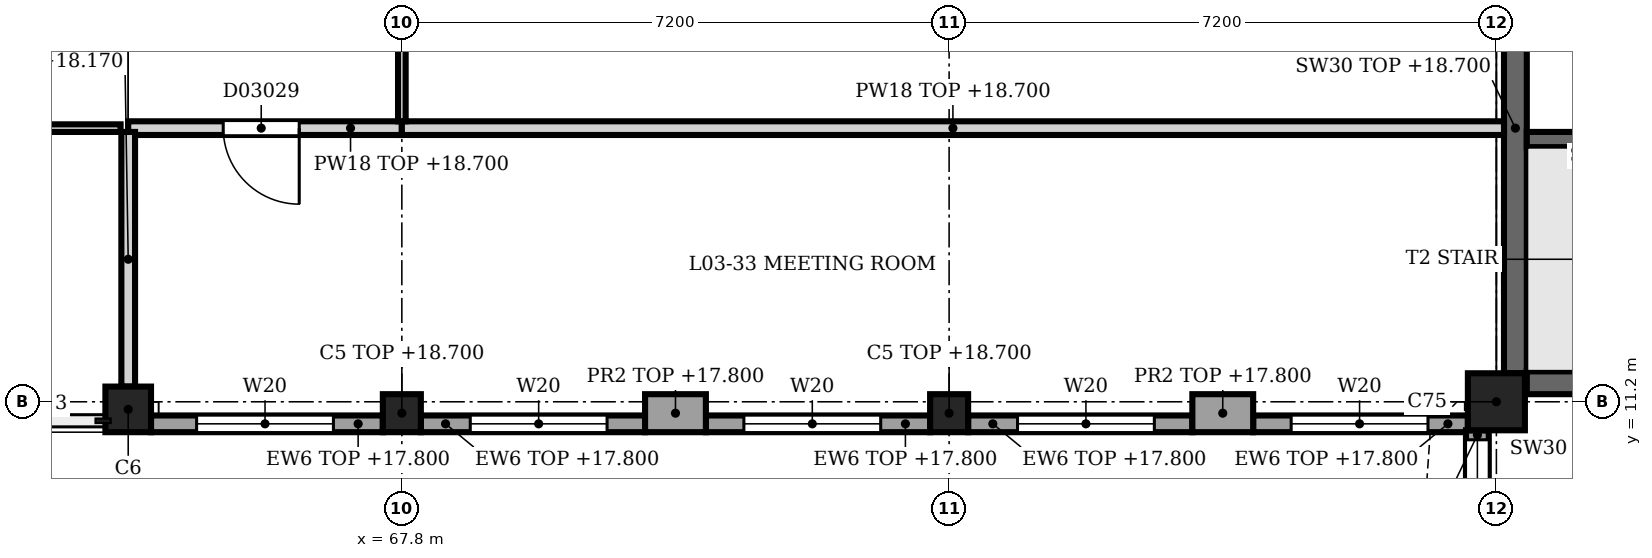
"""IFC4 building model, lengths in metres.
Left out: names, types, materials, properties, quantities, classifications, styles, units other than length and angle.
Written with IfcOpenShell. Run it as: python <this file> out.ifc"""

import sys

from ifc_helpers import new_model, si_unit, direction, frame, frame_2d, origin, origin_2d, place, context, subcontext, project, spatial, rectangle, extrude, element, fill, save


model = new_model("IFC4")
c1 = context("Model", 3, precision=1e-05, world=origin(), true_north=direction((0.0, 1.0)))
c2 = subcontext(c1, "Body", "Model", "MODEL_VIEW")
j1 = project(units=[si_unit("LENGTHUNIT", "METRE"), si_unit("PLANEANGLEUNIT", "RADIAN")], contexts=[c1])
p1 = place(None, origin())
s1 = spatial("IfcSite", under=j1, at=p1, CompositionType="ELEMENT")
p2 = place(p1, origin())
s2 = spatial("IfcBuilding", under=s1, at=p2, CompositionType="ELEMENT")
p3 = place(p2, frame((0.0, 0.0, 14.4)))
s3 = spatial("IfcBuildingStorey", under=s2, at=p3, CompositionType="ELEMENT", Elevation=14.4)
p4 = place(p3, frame((82.2, 11.2, 0.0), z_axis=(0.0, 0.0, 1.0), x_axis=(1.0, 0.0, 0.0)))
e1 = element("IfcColumn", 1, at=p4, inside=s3, PredefinedType="COLUMN", context=c2, shape_type="SweptSolid", body=[
    extrude(rectangle(XDim=0.75, YDim=0.75, at=origin_2d()), origin(), (0.0, 0.0, 1.0), 4.5),
])
p5 = place(p3, frame((64.2, 11.1, 0.0), z_axis=(0.0, 0.0, 1.0), x_axis=(1.0, 0.0, 0.0)))
e2 = element("IfcColumn", 2, at=p5, inside=s3, PredefinedType="COLUMN", context=c2, shape_type="SweptSolid", body=[
    extrude(rectangle(XDim=0.6, YDim=0.6, at=origin_2d()), origin(), (0.0, 0.0, 1.0), 4.5),
])
for number, where, z_axis, x_axis in (
    (3, (67.8, 11.05, 0.0), (0.0, 0.0, 1.0), (1.0, 0.0, 0.0)),
    (4, (75.0, 11.05, 0.0), (0.0, 0.0, 1.0), (1.0, 0.0, 0.0)),
):
    element("IfcColumn", number, at=place(p3, frame(where, z_axis=z_axis, x_axis=x_axis)), inside=s3, PredefinedType="COLUMN", context=c2, shape_type="SweptSolid", body=[
        extrude(rectangle(XDim=0.5, YDim=0.5, at=origin_2d()), origin(), (0.0, 0.0, 1.0), 4.3),
    ])
p6 = place(p3, frame((81.95, 8.0, 0.0), z_axis=(0.0, 0.0, 1.0), x_axis=(0.0, 1.0, 0.0)))
e5 = element("IfcWall", 5, at=p6, inside=s3, PredefinedType="SOLIDWALL", context=c2, shape_type="SweptSolid", body=[
    extrude(rectangle(XDim=2.825, YDim=0.3, at=frame_2d((1.413, 0.0))), origin(), (0.0, 0.0, 1.0), 3.4),
])
p7 = place(p6, frame((0.1, 0.0, 0.9)))
e6 = element("IfcOpeningElement", 6, at=p7, cuts=e5, PredefinedType="OPENING", context=c2, shape_type="SweptSolid", body=[
    extrude(rectangle(XDim=2.6, YDim=2.4, at=frame_2d((1.3, 1.2))), frame((0.0, 0.16, 0.0), z_axis=(0.0, -1.0, 0.0), x_axis=(1.0, 0.0, 0.0)), (0.0, 0.0, 1.0), 0.32),
])
for number, where, z_axis, x_axis in (
    (7, (79.0, 11.05, 0.0), (0.0, 0.0, 1.0), (-1.0, 0.0, 0.0)),
    (8, (71.8, 11.05, 0.0), (0.0, 0.0, 1.0), (-1.0, 0.0, 0.0)),
):
    element("IfcWall", number, at=place(p3, frame(where, z_axis=z_axis, x_axis=x_axis)), inside=s3, PredefinedType="SOLIDWALL", context=c2, shape_type="SweptSolid", body=[
        extrude(rectangle(XDim=0.8, YDim=0.5, at=frame_2d((0.4, 0.0))), origin(), (0.0, 0.0, 1.0), 3.4),
    ])
p8 = place(p3, frame((81.825, 10.91, 0.0), z_axis=(0.0, 0.0, 1.0), x_axis=(-1.0, 0.0, 0.0)))
e9 = element("IfcWall", 9, at=p8, inside=s3, PredefinedType="SOLIDWALL", context=c2, shape_type="SweptSolid", body=[
    extrude(rectangle(XDim=2.825, YDim=0.22, at=frame_2d((1.413, 0.0))), origin(), (0.0, 0.0, 1.0), 3.4),
])
p9 = place(p8, frame((0.525, 0.0, 0.45)))
e10 = element("IfcOpeningElement", 10, at=p9, cuts=e9, PredefinedType="OPENING", context=c2, shape_type="SweptSolid", body=[
    extrude(rectangle(XDim=1.8, YDim=2.7, at=frame_2d((0.9, 1.35))), frame((0.0, 0.12, 0.0), z_axis=(0.0, -1.0, 0.0), x_axis=(1.0, 0.0, 0.0)), (0.0, 0.0, 1.0), 0.24),
])
p10 = place(p3, frame((78.2, 10.91, 0.0), z_axis=(0.0, 0.0, 1.0), x_axis=(-1.0, 0.0, 0.0)))
e11 = element("IfcWall", 11, at=p10, inside=s3, PredefinedType="SOLIDWALL", context=c2, shape_type="SweptSolid", body=[
    extrude(rectangle(XDim=2.95, YDim=0.22, at=frame_2d((1.475, 0.0))), origin(), (0.0, 0.0, 1.0), 3.4),
])
p11 = place(p10, frame((0.5, 0.0, 0.45)))
e12 = element("IfcOpeningElement", 12, at=p11, cuts=e11, PredefinedType="OPENING", context=c2, shape_type="SweptSolid", body=[
    extrude(rectangle(XDim=1.8, YDim=2.7, at=frame_2d((0.9, 1.35))), frame((0.0, 0.12, 0.0), z_axis=(0.0, -1.0, 0.0), x_axis=(1.0, 0.0, 0.0)), (0.0, 0.0, 1.0), 0.24),
])
p12 = place(p3, frame((74.75, 10.91, 0.0), z_axis=(0.0, 0.0, 1.0), x_axis=(-1.0, 0.0, 0.0)))
e13 = element("IfcWall", 13, at=p12, inside=s3, PredefinedType="SOLIDWALL", context=c2, shape_type="SweptSolid", body=[
    extrude(rectangle(XDim=2.95, YDim=0.22, at=frame_2d((1.475, 0.0))), origin(), (0.0, 0.0, 1.0), 3.4),
])
p13 = place(p12, frame((0.65, 0.0, 0.45)))
e14 = element("IfcOpeningElement", 14, at=p13, cuts=e13, PredefinedType="OPENING", context=c2, shape_type="SweptSolid", body=[
    extrude(rectangle(XDim=1.8, YDim=2.7, at=frame_2d((0.9, 1.35))), frame((0.0, 0.12, 0.0), z_axis=(0.0, -1.0, 0.0), x_axis=(1.0, 0.0, 0.0)), (0.0, 0.0, 1.0), 0.24),
])
p14 = place(p3, frame((71.0, 10.91, 0.0), z_axis=(0.0, 0.0, 1.0), x_axis=(-1.0, 0.0, 0.0)))
e15 = element("IfcWall", 15, at=p14, inside=s3, PredefinedType="SOLIDWALL", context=c2, shape_type="SweptSolid", body=[
    extrude(rectangle(XDim=2.95, YDim=0.22, at=frame_2d((1.475, 0.0))), origin(), (0.0, 0.0, 1.0), 3.4),
])
p15 = place(p14, frame((0.5, 0.0, 0.45)))
e16 = element("IfcOpeningElement", 16, at=p15, cuts=e15, PredefinedType="OPENING", context=c2, shape_type="SweptSolid", body=[
    extrude(rectangle(XDim=1.8, YDim=2.7, at=frame_2d((0.9, 1.35))), frame((0.0, 0.12, 0.0), z_axis=(0.0, -1.0, 0.0), x_axis=(1.0, 0.0, 0.0)), (0.0, 0.0, 1.0), 0.24),
])
p16 = place(p3, frame((67.55, 10.91, 0.0), z_axis=(0.0, 0.0, 1.0), x_axis=(-1.0, 0.0, 0.0)))
e17 = element("IfcWall", 17, at=p16, inside=s3, PredefinedType="SOLIDWALL", context=c2, shape_type="SweptSolid", body=[
    extrude(rectangle(XDim=3.05, YDim=0.22, at=frame_2d((1.525, 0.0))), origin(), (0.0, 0.0, 1.0), 3.4),
])
p17 = place(p16, frame((0.65, 0.0, 0.45)))
e18 = element("IfcOpeningElement", 18, at=p17, cuts=e17, PredefinedType="OPENING", context=c2, shape_type="SweptSolid", body=[
    extrude(rectangle(XDim=1.8, YDim=2.7, at=frame_2d((0.9, 1.35))), frame((0.0, 0.12, 0.0), z_axis=(0.0, -1.0, 0.0), x_axis=(1.0, 0.0, 0.0)), (0.0, 0.0, 1.0), 0.24),
])
p18 = place(p3, frame((82.45, 11.575, 0.0), z_axis=(0.0, 0.0, 1.0), x_axis=(0.0, 1.0, 0.0)))
e19 = element("IfcWall", 19, at=p18, inside=s3, PredefinedType="SHEAR", context=c2, shape_type="SweptSolid", body=[
    extrude(rectangle(XDim=6.45, YDim=0.3, at=frame_2d((3.225, 0.0))), origin(), (0.0, 0.0, 1.0), 4.3),
])
p19 = place(p3, frame((82.6, 11.45, 0.0), z_axis=(0.0, 0.0, 1.0), x_axis=(1.0, 0.0, 0.0)))
e20 = element("IfcWall", 20, at=p19, inside=s3, PredefinedType="SHEAR", context=c2, shape_type="SweptSolid", body=[
    extrude(rectangle(XDim=6.4, YDim=0.3, at=frame_2d((3.2, 0.0))), origin(), (0.0, 0.0, 1.0), 4.3),
])
p20 = place(p3, frame((89.0, 14.65, 0.0), z_axis=(0.0, 0.0, 1.0), x_axis=(-1.0, 0.0, 0.0)))
e21 = element("IfcWall", 21, at=p20, inside=s3, PredefinedType="SHEAR", context=c2, shape_type="SweptSolid", body=[
    extrude(rectangle(XDim=6.4, YDim=0.2, at=frame_2d((3.2, 0.0))), origin(), (0.0, 0.0, 1.0), 4.3),
])
p21 = place(p20, frame((0.1, 0.0, 0.0)))
e22 = element("IfcOpeningElement", 22, at=p21, cuts=e21, PredefinedType="OPENING", context=c2, shape_type="SweptSolid", body=[
    extrude(rectangle(XDim=1.0, YDim=2.1, at=frame_2d((0.5, 1.05))), frame((0.0, 0.11, 0.0), z_axis=(0.0, -1.0, 0.0), x_axis=(1.0, 0.0, 0.0)), (0.0, 0.0, 1.0), 0.22),
])
p22 = place(p3, frame((64.1, 14.8, 0.0), z_axis=(0.0, 0.0, 1.0), x_axis=(-1.0, 0.0, 0.0)))
e23 = element("IfcWall", 23, at=p22, inside=s3, PredefinedType="PARTITIONING", context=c2, shape_type="SweptSolid", body=[
    extrude(rectangle(XDim=3.4, YDim=0.1, at=frame_2d((1.7, 0.0))), origin(), (0.0, 0.0, 1.0), 11.4),
])
p23 = place(p22, frame((1.15, 0.0, 0.0)))
e24 = element("IfcOpeningElement", 24, at=p23, cuts=e23, PredefinedType="OPENING", context=c2, shape_type="SweptSolid", body=[
    extrude(rectangle(XDim=1.0, YDim=2.1, at=frame_2d((0.5, 1.05))), frame((0.0, 0.06, 0.0), z_axis=(0.0, -1.0, 0.0), x_axis=(1.0, 0.0, 0.0)), (0.0, 0.0, 1.0), 0.12),
])
p24 = place(p3, frame((67.8, 14.8, 0.0), z_axis=(0.0, 0.0, 1.0), x_axis=(-1.0, 0.0, 0.0)))
e25 = element("IfcWall", 25, at=p24, inside=s3, PredefinedType="PARTITIONING", context=c2, shape_type="SweptSolid", body=[
    extrude(rectangle(XDim=3.6, YDim=0.18, at=frame_2d((1.8, 0.0))), origin(), (0.0, 0.0, 1.0), 4.3),
])
p25 = place(p24, frame((1.35, 0.0, 0.0)))
e26 = element("IfcOpeningElement", 26, at=p25, cuts=e25, PredefinedType="OPENING", context=c2, shape_type="SweptSolid", body=[
    extrude(rectangle(XDim=1.0, YDim=2.1, at=frame_2d((0.5, 1.05))), frame((0.0, 0.1, 0.0), z_axis=(0.0, -1.0, 0.0), x_axis=(1.0, 0.0, 0.0)), (0.0, 0.0, 1.0), 0.2),
])
p26 = place(p3, frame((67.8, 14.8, 0.0), z_axis=(0.0, 0.0, 1.0), x_axis=(1.0, 0.0, 0.0)))
e27 = element("IfcWall", 27, at=p26, inside=s3, PredefinedType="PARTITIONING", context=c2, shape_type="SweptSolid", body=[
    extrude(rectangle(XDim=14.5, YDim=0.18, at=frame_2d((7.25, 0.0))), origin(), (0.0, 0.0, 1.0), 4.3),
])
p27 = place(p3, frame((64.2, 11.4, 0.0), z_axis=(0.0, 0.0, 1.0), x_axis=(0.0, 1.0, 0.0)))
e28 = element("IfcWall", 28, at=p27, inside=s3, PredefinedType="PARTITIONING", context=c2, shape_type="SweptSolid", body=[
    extrude(rectangle(XDim=3.35, YDim=0.18, at=frame_2d((1.675, 0.0))), origin(), (0.0, 0.0, 1.0), 3.77),
])
p28 = place(p3, frame((67.8, 18.15, 0.0), z_axis=(0.0, 0.0, 1.0), x_axis=(0.0, -1.0, 0.0)))
e29 = element("IfcWall", 29, at=p28, inside=s3, PredefinedType="PARTITIONING", context=c2, shape_type="SweptSolid", body=[
    extrude(rectangle(XDim=3.26, YDim=0.1, at=frame_2d((1.63, 0.0))), origin(), (0.0, 0.0, 1.0), 3.57),
])
p29 = place(p28, origin())
e30 = element("IfcOpeningElement", 30, at=p29, cuts=e29, PredefinedType="OPENING", context=c2, shape_type="SweptSolid", body=[
    extrude(rectangle(XDim=1.0, YDim=2.1, at=frame_2d((0.5, 1.05))), frame((0.0, 0.06, 0.0), z_axis=(0.0, -1.0, 0.0), x_axis=(1.0, 0.0, 0.0)), (0.0, 0.0, 1.0), 0.12),
])
p30 = place(p7, origin())
e31 = element("IfcWindow", 31, at=p30, inside=s3, PartitioningType="SINGLE_PANEL", PredefinedType="WINDOW", context=c2, shape_type="SweptSolid", body=[
    extrude(rectangle(XDim=2.6, YDim=2.4, at=frame_2d((1.3, 1.2))), frame((0.0, 0.03, 0.0), z_axis=(0.0, -1.0, 0.0), x_axis=(1.0, 0.0, 0.0)), (0.0, 0.0, 1.0), 0.06),
])
fill(e6, e31)
p31 = place(p9, origin())
e32 = element("IfcWindow", 32, at=p31, inside=s3, PartitioningType="SINGLE_PANEL", PredefinedType="WINDOW", context=c2, shape_type="SweptSolid", body=[
    extrude(rectangle(XDim=1.8, YDim=2.7, at=frame_2d((0.9, 1.35))), frame((0.0, 0.03, 0.0), z_axis=(0.0, -1.0, 0.0), x_axis=(1.0, 0.0, 0.0)), (0.0, 0.0, 1.0), 0.06),
])
fill(e10, e32)
p32 = place(p11, origin())
e33 = element("IfcWindow", 33, at=p32, inside=s3, PartitioningType="SINGLE_PANEL", PredefinedType="WINDOW", context=c2, shape_type="SweptSolid", body=[
    extrude(rectangle(XDim=1.8, YDim=2.7, at=frame_2d((0.9, 1.35))), frame((0.0, 0.03, 0.0), z_axis=(0.0, -1.0, 0.0), x_axis=(1.0, 0.0, 0.0)), (0.0, 0.0, 1.0), 0.06),
])
fill(e12, e33)
p33 = place(p13, origin())
e34 = element("IfcWindow", 34, at=p33, inside=s3, PartitioningType="SINGLE_PANEL", PredefinedType="WINDOW", context=c2, shape_type="SweptSolid", body=[
    extrude(rectangle(XDim=1.8, YDim=2.7, at=frame_2d((0.9, 1.35))), frame((0.0, 0.03, 0.0), z_axis=(0.0, -1.0, 0.0), x_axis=(1.0, 0.0, 0.0)), (0.0, 0.0, 1.0), 0.06),
])
fill(e14, e34)
p34 = place(p15, origin())
e35 = element("IfcWindow", 35, at=p34, inside=s3, PartitioningType="SINGLE_PANEL", PredefinedType="WINDOW", context=c2, shape_type="SweptSolid", body=[
    extrude(rectangle(XDim=1.8, YDim=2.7, at=frame_2d((0.9, 1.35))), frame((0.0, 0.03, 0.0), z_axis=(0.0, -1.0, 0.0), x_axis=(1.0, 0.0, 0.0)), (0.0, 0.0, 1.0), 0.06),
])
fill(e16, e35)
p35 = place(p17, origin())
e36 = element("IfcWindow", 36, at=p35, inside=s3, PartitioningType="SINGLE_PANEL", PredefinedType="WINDOW", context=c2, shape_type="SweptSolid", body=[
    extrude(rectangle(XDim=1.8, YDim=2.7, at=frame_2d((0.9, 1.35))), frame((0.0, 0.03, 0.0), z_axis=(0.0, -1.0, 0.0), x_axis=(1.0, 0.0, 0.0)), (0.0, 0.0, 1.0), 0.06),
])
fill(e18, e36)
p36 = place(p25, origin())
e37 = element("IfcDoor", 37, at=p36, inside=s3, OperationType="SINGLE_SWING_RIGHT", PredefinedType="DOOR", context=c2, shape_type="SweptSolid", body=[
    extrude(rectangle(XDim=1.0, YDim=2.1, at=frame_2d((0.5, 1.05))), frame((0.0, 0.025, 0.0), z_axis=(0.0, -1.0, 0.0), x_axis=(1.0, 0.0, 0.0)), (0.0, 0.0, 1.0), 0.05),
])
fill(e26, e37)
save(model, sys.argv[1])
